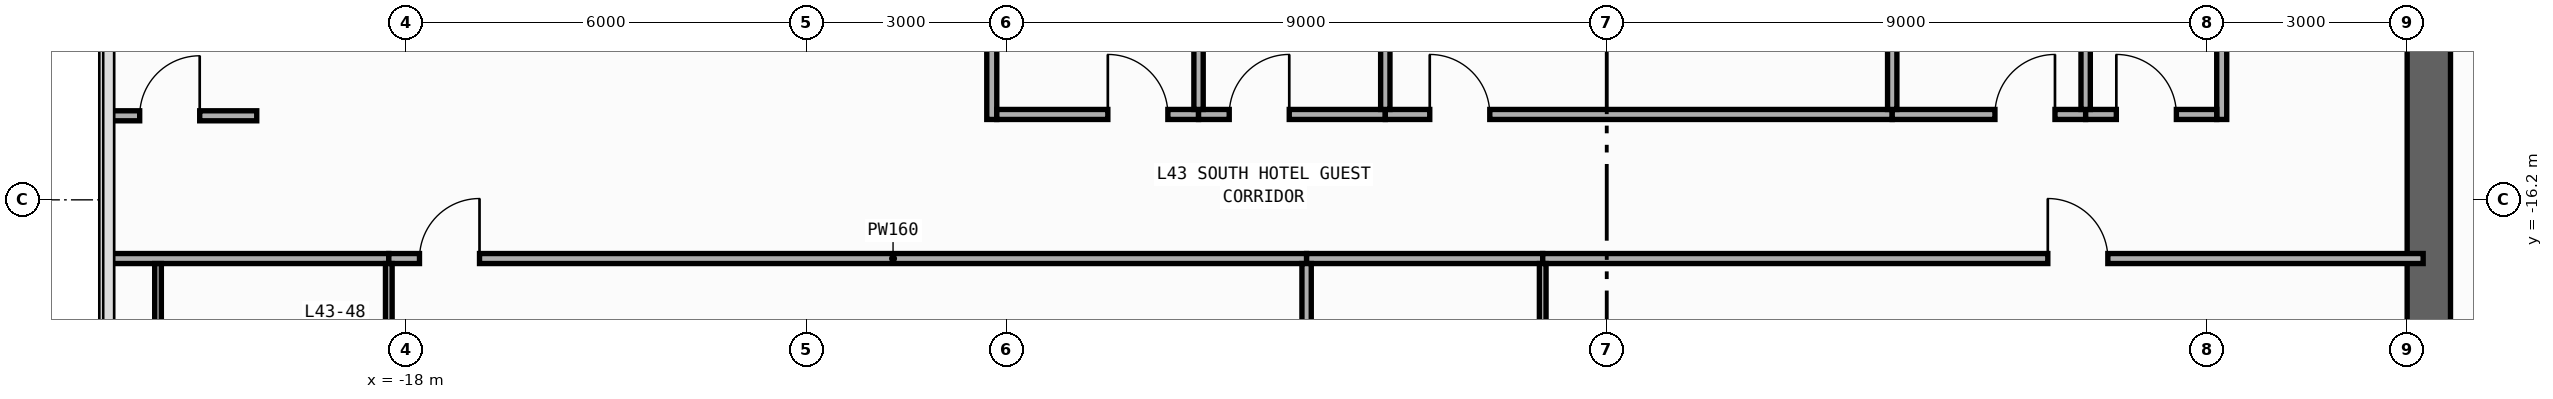
"""IFC4 building model, lengths in metres.
Left out: names, types, materials, properties, quantities, classifications, styles, units other than length and angle.
Written with IfcOpenShell. Run it as: python <this file> out.ifc"""

import sys

from ifc_helpers import new_model, si_unit, direction, frame, frame_2d, origin, place, context, subcontext, project, spatial, rectangle, extrude, element, fill, save


model = new_model("IFC4")
c1 = context("Model", 3, precision=1e-05, world=origin(), true_north=direction((0.0, 1.0)))
c2 = subcontext(c1, "Body", "Model", "MODEL_VIEW")
j1 = project(units=[si_unit("LENGTHUNIT", "METRE"), si_unit("PLANEANGLEUNIT", "RADIAN")], contexts=[c1])
p1 = place(None, origin())
s1 = spatial("IfcSite", under=j1, at=p1, CompositionType="ELEMENT")
p2 = place(p1, origin())
s2 = spatial("IfcBuilding", under=s1, at=p2, CompositionType="ELEMENT")
p3 = place(p2, frame((0.0, 0.0, 187.8)))
s3 = spatial("IfcBuildingStorey", under=s2, at=p3, CompositionType="ELEMENT", Elevation=187.8)
p4 = place(p3, frame((12.325, -19.8, 0.0), z_axis=(0.0, 0.0, 1.0), x_axis=(0.0, 1.0, 0.0)))
e1 = element("IfcWall", 1, at=p4, inside=s3, PredefinedType="SHEAR", context=c2, shape_type="SweptSolid", body=[
    extrude(rectangle(XDim=27.0, YDim=0.65, at=frame_2d((13.5, 0.0))), origin(), (0.0, 0.0, 1.0), 3.54),
])
p5 = place(p4, frame((23.05, 0.0, 0.0)))
e2 = element("IfcOpeningElement", 2, at=p5, cuts=e1, PredefinedType="OPENING", context=c2, shape_type="SweptSolid", body=[
    extrude(rectangle(XDim=1.1, YDim=2.2, at=frame_2d((0.55, 1.1))), frame((0.0, 0.335, 0.0), z_axis=(0.0, -1.0, 0.0), x_axis=(1.0, 0.0, 0.0)), (0.0, 0.0, 1.0), 0.67),
])
p6 = place(p4, frame((19.85, 0.0, 0.0)))
e3 = element("IfcOpeningElement", 3, at=p6, cuts=e1, PredefinedType="OPENING", context=c2, shape_type="SweptSolid", body=[
    extrude(rectangle(XDim=1.1, YDim=2.2, at=frame_2d((0.55, 1.1))), frame((0.0, 0.335, 0.0), z_axis=(0.0, -1.0, 0.0), x_axis=(1.0, 0.0, 0.0)), (0.0, 0.0, 1.0), 0.67),
])
p7 = place(p4, frame((16.65, 0.0, 0.0)))
e4 = element("IfcOpeningElement", 4, at=p7, cuts=e1, PredefinedType="OPENING", context=c2, shape_type="SweptSolid", body=[
    extrude(rectangle(XDim=1.1, YDim=2.2, at=frame_2d((0.55, 1.1))), frame((0.0, 0.335, 0.0), z_axis=(0.0, -1.0, 0.0), x_axis=(1.0, 0.0, 0.0)), (0.0, 0.0, 1.0), 0.67),
])
p8 = place(p4, frame((10.175, 0.0, 0.0)))
e5 = element("IfcOpeningElement", 5, at=p8, cuts=e1, PredefinedType="OPENING", context=c2, shape_type="SweptSolid", body=[
    extrude(rectangle(XDim=0.85, YDim=2.1, at=frame_2d((0.425, 1.05))), frame((0.0, 0.335, 0.0), z_axis=(0.0, -1.0, 0.0), x_axis=(1.0, 0.0, 0.0)), (0.0, 0.0, 1.0), 0.67),
])
p9 = place(p4, frame((12.725, 0.0, 0.0)))
e6 = element("IfcOpeningElement", 6, at=p9, cuts=e1, PredefinedType="OPENING", context=c2, shape_type="SweptSolid", body=[
    extrude(rectangle(XDim=1.15, YDim=2.2, at=frame_2d((0.575, 1.1))), frame((0.0, 0.335, 0.0), z_axis=(0.0, -1.0, 0.0), x_axis=(1.0, 0.0, 0.0)), (0.0, 0.0, 1.0), 0.67),
])
p10 = place(p4, frame((25.125, 0.0, 0.0)))
e7 = element("IfcOpeningElement", 7, at=p10, cuts=e1, PredefinedType="OPENING", context=c2, shape_type="SweptSolid", body=[
    extrude(rectangle(XDim=0.85, YDim=2.1, at=frame_2d((0.425, 1.05))), frame((0.0, 0.335, 0.0), z_axis=(0.0, -1.0, 0.0), x_axis=(1.0, 0.0, 0.0)), (0.0, 0.0, 1.0), 0.67),
])
p11 = place(p3, frame((-9.22, -14.995, 0.0), z_axis=(0.0, 0.0, 1.0), x_axis=(0.0, 1.0, 0.0)))
e8 = element("IfcWall", 8, at=p11, inside=s3, PredefinedType="PARTITIONING", context=c2, shape_type="SweptSolid", body=[
    extrude(rectangle(XDim=9.195, YDim=0.15, at=frame_2d((4.598, 0.0))), origin(), (0.0, 0.0, 1.0), 2.952),
])
p12 = place(p11, frame((7.835, 0.0, 0.0)))
e9 = element("IfcOpeningElement", 9, at=p12, cuts=e8, PredefinedType="OPENING", context=c2, shape_type="SweptSolid", body=[
    extrude(rectangle(XDim=0.9, YDim=2.15, at=frame_2d((0.45, 1.075))), frame((0.0, 0.085, 0.0), z_axis=(0.0, -1.0, 0.0), x_axis=(1.0, 0.0, 0.0)), (0.0, 0.0, 1.0), 0.17),
])
p13 = place(p3, frame((9.22, -14.995, 0.0), z_axis=(0.0, 0.0, 1.0), x_axis=(0.0, 1.0, 0.0)))
e10 = element("IfcWall", 10, at=p13, inside=s3, PredefinedType="PARTITIONING", context=c2, shape_type="SweptSolid", body=[
    extrude(rectangle(XDim=9.195, YDim=0.15, at=frame_2d((4.598, 0.0))), origin(), (0.0, 0.0, 1.0), 2.952),
])
p14 = place(p13, frame((7.835, 0.0, 0.0)))
e11 = element("IfcOpeningElement", 11, at=p14, cuts=e10, PredefinedType="OPENING", context=c2, shape_type="SweptSolid", body=[
    extrude(rectangle(XDim=0.9, YDim=2.15, at=frame_2d((0.45, 1.075))), frame((0.0, 0.085, 0.0), z_axis=(0.0, -1.0, 0.0), x_axis=(1.0, 0.0, 0.0)), (0.0, 0.0, 1.0), 0.17),
])
p15 = place(p3, frame((-9.145, -14.92, 0.0), z_axis=(0.0, 0.0, 1.0), x_axis=(1.0, 0.0, 0.0)))
e12 = element("IfcWall", 12, at=p15, inside=s3, PredefinedType="PARTITIONING", context=c2, shape_type="SweptSolid", body=[
    extrude(rectangle(XDim=3.025, YDim=0.15, at=frame_2d((1.512, 0.0))), origin(), (0.0, 0.0, 1.0), 3.54),
])
p16 = place(p15, frame((1.665, 0.0, 0.0)))
e13 = element("IfcOpeningElement", 13, at=p16, cuts=e12, PredefinedType="OPENING", context=c2, shape_type="SweptSolid", body=[
    extrude(rectangle(XDim=0.9, YDim=2.15, at=frame_2d((0.45, 1.075))), frame((0.0, 0.085, 0.0), z_axis=(0.0, -1.0, 0.0), x_axis=(1.0, 0.0, 0.0)), (0.0, 0.0, 1.0), 0.17),
])
p17 = place(p3, frame((-6.12, -14.92, 0.0), z_axis=(0.0, 0.0, 1.0), x_axis=(1.0, 0.0, 0.0)))
e14 = element("IfcWall", 14, at=p17, inside=s3, PredefinedType="PARTITIONING", context=c2, shape_type="SweptSolid", body=[
    extrude(rectangle(XDim=2.8, YDim=0.15, at=frame_2d((1.4, 0.0))), origin(), (0.0, 0.0, 1.0), 3.54),
])
p18 = place(p17, frame((0.46, 0.0, 0.0)))
e15 = element("IfcOpeningElement", 15, at=p18, cuts=e14, PredefinedType="OPENING", context=c2, shape_type="SweptSolid", body=[
    extrude(rectangle(XDim=0.9, YDim=2.15, at=frame_2d((0.45, 1.075))), frame((0.0, 0.085, 0.0), z_axis=(0.0, -1.0, 0.0), x_axis=(1.0, 0.0, 0.0)), (0.0, 0.0, 1.0), 0.17),
])
p19 = place(p3, frame((-3.32, -14.92, 0.0), z_axis=(0.0, 0.0, 1.0), x_axis=(1.0, 0.0, 0.0)))
e16 = element("IfcWall", 16, at=p19, inside=s3, PredefinedType="PARTITIONING", context=c2, shape_type="SweptSolid", body=[
    extrude(rectangle(XDim=7.6, YDim=0.15, at=frame_2d((3.8, 0.0))), origin(), (0.0, 0.0, 1.0), 3.54),
])
p20 = place(p19, frame((0.667, 0.0, 0.0)))
e17 = element("IfcOpeningElement", 17, at=p20, cuts=e16, PredefinedType="OPENING", context=c2, shape_type="SweptSolid", body=[
    extrude(rectangle(XDim=0.9, YDim=2.15, at=frame_2d((0.45, 1.075))), frame((0.0, 0.085, 0.0), z_axis=(0.0, -1.0, 0.0), x_axis=(1.0, 0.0, 0.0)), (0.0, 0.0, 1.0), 0.17),
])
p21 = place(p3, frame((4.28, -14.92, 0.0), z_axis=(0.0, 0.0, 1.0), x_axis=(1.0, 0.0, 0.0)))
e18 = element("IfcWall", 18, at=p21, inside=s3, PredefinedType="PARTITIONING", context=c2, shape_type="SweptSolid", body=[
    extrude(rectangle(XDim=2.9, YDim=0.15, at=frame_2d((1.45, 0.0))), origin(), (0.0, 0.0, 1.0), 3.54),
])
p22 = place(p21, frame((1.54, 0.0, 0.0)))
e19 = element("IfcOpeningElement", 19, at=p22, cuts=e18, PredefinedType="OPENING", context=c2, shape_type="SweptSolid", body=[
    extrude(rectangle(XDim=0.9, YDim=2.15, at=frame_2d((0.45, 1.075))), frame((0.0, 0.085, 0.0), z_axis=(0.0, -1.0, 0.0), x_axis=(1.0, 0.0, 0.0)), (0.0, 0.0, 1.0), 0.17),
])
p23 = place(p3, frame((7.18, -14.92, 0.0), z_axis=(0.0, 0.0, 1.0), x_axis=(1.0, 0.0, 0.0)))
e20 = element("IfcWall", 20, at=p23, inside=s3, PredefinedType="PARTITIONING", context=c2, shape_type="SweptSolid", body=[
    extrude(rectangle(XDim=1.965, YDim=0.15, at=frame_2d((0.982, 0.0))), origin(), (0.0, 0.0, 1.0), 3.54),
])
p24 = place(p23, frame((0.46, 0.0, 0.0)))
e21 = element("IfcOpeningElement", 21, at=p24, cuts=e20, PredefinedType="OPENING", context=c2, shape_type="SweptSolid", body=[
    extrude(rectangle(XDim=0.9, YDim=2.15, at=frame_2d((0.45, 1.075))), frame((0.0, 0.085, 0.0), z_axis=(0.0, -1.0, 0.0), x_axis=(1.0, 0.0, 0.0)), (0.0, 0.0, 1.0), 0.17),
])
p25 = place(p3, frame((-22.455, -17.08, 0.0), z_axis=(0.0, 0.0, 1.0), x_axis=(1.0, 0.0, 0.0)))
e22 = element("IfcWall", 22, at=p25, inside=s3, PredefinedType="PARTITIONING", context=c2, shape_type="SweptSolid", body=[
    extrude(rectangle(XDim=4.195, YDim=0.15, at=frame_2d((2.098, 0.0))), origin(), (0.0, 0.0, 1.0), 3.54),
])
p26 = place(p3, frame((-18.26, -17.08, 0.0), z_axis=(0.0, 0.0, 1.0), x_axis=(1.0, 0.0, 0.0)))
e23 = element("IfcWall", 23, at=p26, inside=s3, PredefinedType="PARTITIONING", context=c2, shape_type="SweptSolid", body=[
    extrude(rectangle(XDim=13.76, YDim=0.15, at=frame_2d((6.88, 0.0))), origin(), (0.0, 0.0, 1.0), 3.54),
])
p27 = place(p26, frame((0.46, 0.0, 0.0)))
e24 = element("IfcOpeningElement", 24, at=p27, cuts=e23, PredefinedType="OPENING", context=c2, shape_type="SweptSolid", body=[
    extrude(rectangle(XDim=0.9, YDim=2.15, at=frame_2d((0.45, 1.075))), frame((0.0, 0.085, 0.0), z_axis=(0.0, -1.0, 0.0), x_axis=(1.0, 0.0, 0.0)), (0.0, 0.0, 1.0), 0.17),
])
p28 = place(p3, frame((-4.5, -17.08, 0.0), z_axis=(0.0, 0.0, 1.0), x_axis=(1.0, 0.0, 0.0)))
e25 = element("IfcWall", 25, at=p28, inside=s3, PredefinedType="PARTITIONING", context=c2, shape_type="SweptSolid", body=[
    extrude(rectangle(XDim=3.54, YDim=0.15, at=frame_2d((1.77, 0.0))), origin(), (0.0, 0.0, 1.0), 3.54),
])
p29 = place(p3, frame((-0.96, -17.08, 0.0), z_axis=(0.0, 0.0, 1.0), x_axis=(1.0, 0.0, 0.0)))
e26 = element("IfcWall", 26, at=p29, inside=s3, PredefinedType="PARTITIONING", context=c2, shape_type="SweptSolid", body=[
    extrude(rectangle(XDim=13.2, YDim=0.15, at=frame_2d((6.6, 0.0))), origin(), (0.0, 0.0, 1.0), 3.54),
])
p30 = place(p29, frame((7.573, 0.0, 0.0)))
e27 = element("IfcOpeningElement", 27, at=p30, cuts=e26, PredefinedType="OPENING", context=c2, shape_type="SweptSolid", body=[
    extrude(rectangle(XDim=0.9, YDim=2.15, at=frame_2d((0.45, 1.075))), frame((0.0, 0.085, 0.0), z_axis=(0.0, -1.0, 0.0), x_axis=(1.0, 0.0, 0.0)), (0.0, 0.0, 1.0), 0.17),
])
p31 = place(p3, frame((-22.455, -14.94, 0.0), z_axis=(0.0, 0.0, 1.0), x_axis=(1.0, 0.0, 0.0)))
e28 = element("IfcWall", 28, at=p31, inside=s3, PredefinedType="PARTITIONING", context=c2, shape_type="SweptSolid", body=[
    extrude(rectangle(XDim=2.215, YDim=0.15, at=frame_2d((1.107, 0.0))), origin(), (0.0, 0.0, 1.0), 3.54),
])
p32 = place(p31, frame((0.46, 0.0, 0.0)))
e29 = element("IfcOpeningElement", 29, at=p32, cuts=e28, PredefinedType="OPENING", context=c2, shape_type="SweptSolid", body=[
    extrude(rectangle(XDim=0.9, YDim=2.15, at=frame_2d((0.45, 1.075))), frame((0.0, 0.085, 0.0), z_axis=(0.0, -1.0, 0.0), x_axis=(1.0, 0.0, 0.0)), (0.0, 0.0, 1.0), 0.17),
])
p33 = place(p3, frame((-6.12, -14.845, 0.0), z_axis=(0.0, 0.0, 1.0), x_axis=(0.0, 1.0, 0.0)))
e30 = element("IfcWall", 30, at=p33, inside=s3, PredefinedType="PARTITIONING", context=c2, shape_type="SweptSolid", body=[
    extrude(rectangle(XDim=8.975, YDim=0.14, at=frame_2d((4.487, 0.0))), origin(), (0.0, 0.0, 1.0), 3.54),
])
p34 = place(p3, frame((-3.32, -14.845, 0.0), z_axis=(0.0, 0.0, 1.0), x_axis=(0.0, 1.0, 0.0)))
e31 = element("IfcWall", 31, at=p34, inside=s3, PredefinedType="PARTITIONING", context=c2, shape_type="SweptSolid", body=[
    extrude(rectangle(XDim=9.115, YDim=0.14, at=frame_2d((4.558, 0.0))), origin(), (0.0, 0.0, 1.0), 3.54),
])
for number, where, z_axis, x_axis in (
    (32, (4.28, -14.845, 0.0), (0.0, 0.0, 1.0), (0.0, 1.0, 0.0)),
    (33, (7.18, -14.845, 0.0), (0.0, 0.0, 1.0), (0.0, 1.0, 0.0)),
):
    element("IfcWall", number, at=place(p3, frame(where, z_axis=z_axis, x_axis=x_axis)), inside=s3, PredefinedType="PARTITIONING", context=c2, shape_type="SweptSolid", body=[
        extrude(rectangle(XDim=2.885, YDim=0.14, at=frame_2d((1.442, 0.0))), origin(), (0.0, 0.0, 1.0), 3.54),
    ])
p35 = place(p3, frame((-18.26, -20.12, 0.0), z_axis=(0.0, 0.0, 1.0), x_axis=(0.0, 1.0, 0.0)))
e34 = element("IfcWall", 34, at=p35, inside=s3, PredefinedType="PARTITIONING", context=c2, shape_type="SweptSolid", body=[
    extrude(rectangle(XDim=2.965, YDim=0.1, at=frame_2d((1.482, 0.0))), origin(), (0.0, 0.0, 1.0), 3.54),
])
p36 = place(p35, frame((0.46, 0.0, 0.0)))
e35 = element("IfcOpeningElement", 35, at=p36, cuts=e34, PredefinedType="OPENING", context=c2, shape_type="SweptSolid", body=[
    extrude(rectangle(XDim=0.8, YDim=2.1, at=frame_2d((0.4, 1.05))), frame((0.0, 0.06, 0.0), z_axis=(0.0, -1.0, 0.0), x_axis=(1.0, 0.0, 0.0)), (0.0, 0.0, 1.0), 0.12),
])
p37 = place(p3, frame((-4.5, -20.17, 0.0), z_axis=(0.0, 0.0, 1.0), x_axis=(0.0, 1.0, 0.0)))
e36 = element("IfcWall", 36, at=p37, inside=s3, PredefinedType="PARTITIONING", context=c2, shape_type="SweptSolid", body=[
    extrude(rectangle(XDim=3.015, YDim=0.14, at=frame_2d((1.507, 0.0))), origin(), (0.0, 0.0, 1.0), 3.54),
])
for number, where, z_axis, x_axis in (
    (37, (-0.96, -20.12, 0.0), (0.0, 0.0, 1.0), (0.0, 1.0, 0.0)),
    (38, (-21.72, -20.12, 0.0), (0.0, 0.0, 1.0), (0.0, 1.0, 0.0)),
):
    element("IfcWall", number, at=place(p3, frame(where, z_axis=z_axis, x_axis=x_axis)), inside=s3, PredefinedType="PARTITIONING", context=c2, shape_type="SweptSolid", body=[
        extrude(rectangle(XDim=2.965, YDim=0.1, at=frame_2d((1.482, 0.0))), origin(), (0.0, 0.0, 1.0), 3.54),
    ])
p38 = place(p16, origin())
e39 = element("IfcDoor", 39, at=p38, inside=s3, OperationType="SINGLE_SWING_LEFT", PredefinedType="DOOR", context=c2, shape_type="SweptSolid", body=[
    extrude(rectangle(XDim=0.9, YDim=2.15, at=frame_2d((0.45, 1.075))), frame((0.0, 0.025, 0.0), z_axis=(0.0, -1.0, 0.0), x_axis=(1.0, 0.0, 0.0)), (0.0, 0.0, 1.0), 0.05),
])
fill(e13, e39)
p39 = place(p18, origin())
e40 = element("IfcDoor", 40, at=p39, inside=s3, OperationType="SINGLE_SWING_RIGHT", PredefinedType="DOOR", context=c2, shape_type="SweptSolid", body=[
    extrude(rectangle(XDim=0.9, YDim=2.15, at=frame_2d((0.45, 1.075))), frame((0.0, 0.025, 0.0), z_axis=(0.0, -1.0, 0.0), x_axis=(1.0, 0.0, 0.0)), (0.0, 0.0, 1.0), 0.05),
])
fill(e15, e40)
p40 = place(p20, origin())
e41 = element("IfcDoor", 41, at=p40, inside=s3, OperationType="SINGLE_SWING_LEFT", PredefinedType="DOOR", context=c2, shape_type="SweptSolid", body=[
    extrude(rectangle(XDim=0.9, YDim=2.15, at=frame_2d((0.45, 1.075))), frame((0.0, 0.025, 0.0), z_axis=(0.0, -1.0, 0.0), x_axis=(1.0, 0.0, 0.0)), (0.0, 0.0, 1.0), 0.05),
])
fill(e17, e41)
p41 = place(p22, origin())
e42 = element("IfcDoor", 42, at=p41, inside=s3, OperationType="SINGLE_SWING_RIGHT", PredefinedType="DOOR", context=c2, shape_type="SweptSolid", body=[
    extrude(rectangle(XDim=0.9, YDim=2.15, at=frame_2d((0.45, 1.075))), frame((0.0, 0.025, 0.0), z_axis=(0.0, -1.0, 0.0), x_axis=(1.0, 0.0, 0.0)), (0.0, 0.0, 1.0), 0.05),
])
fill(e19, e42)
p42 = place(p24, origin())
e43 = element("IfcDoor", 43, at=p42, inside=s3, OperationType="SINGLE_SWING_LEFT", PredefinedType="DOOR", context=c2, shape_type="SweptSolid", body=[
    extrude(rectangle(XDim=0.9, YDim=2.15, at=frame_2d((0.45, 1.075))), frame((0.0, 0.025, 0.0), z_axis=(0.0, -1.0, 0.0), x_axis=(1.0, 0.0, 0.0)), (0.0, 0.0, 1.0), 0.05),
])
fill(e21, e43)
p43 = place(p27, origin())
e44 = element("IfcDoor", 44, at=p43, inside=s3, OperationType="SINGLE_SWING_RIGHT", PredefinedType="DOOR", context=c2, shape_type="SweptSolid", body=[
    extrude(rectangle(XDim=0.9, YDim=2.15, at=frame_2d((0.45, 1.075))), frame((0.0, 0.025, 0.0), z_axis=(0.0, -1.0, 0.0), x_axis=(1.0, 0.0, 0.0)), (0.0, 0.0, 1.0), 0.05),
])
fill(e24, e44)
p44 = place(p30, origin())
e45 = element("IfcDoor", 45, at=p44, inside=s3, OperationType="SINGLE_SWING_LEFT", PredefinedType="DOOR", context=c2, shape_type="SweptSolid", body=[
    extrude(rectangle(XDim=0.9, YDim=2.15, at=frame_2d((0.45, 1.075))), frame((0.0, 0.025, 0.0), z_axis=(0.0, -1.0, 0.0), x_axis=(1.0, 0.0, 0.0)), (0.0, 0.0, 1.0), 0.05),
])
fill(e27, e45)
p45 = place(p32, origin())
e46 = element("IfcDoor", 46, at=p45, inside=s3, OperationType="SINGLE_SWING_RIGHT", PredefinedType="DOOR", context=c2, shape_type="SweptSolid", body=[
    extrude(rectangle(XDim=0.9, YDim=2.15, at=frame_2d((0.45, 1.075))), frame((0.0, 0.025, 0.0), z_axis=(0.0, -1.0, 0.0), x_axis=(1.0, 0.0, 0.0)), (0.0, 0.0, 1.0), 0.05),
])
fill(e29, e46)
save(model, sys.argv[1])
